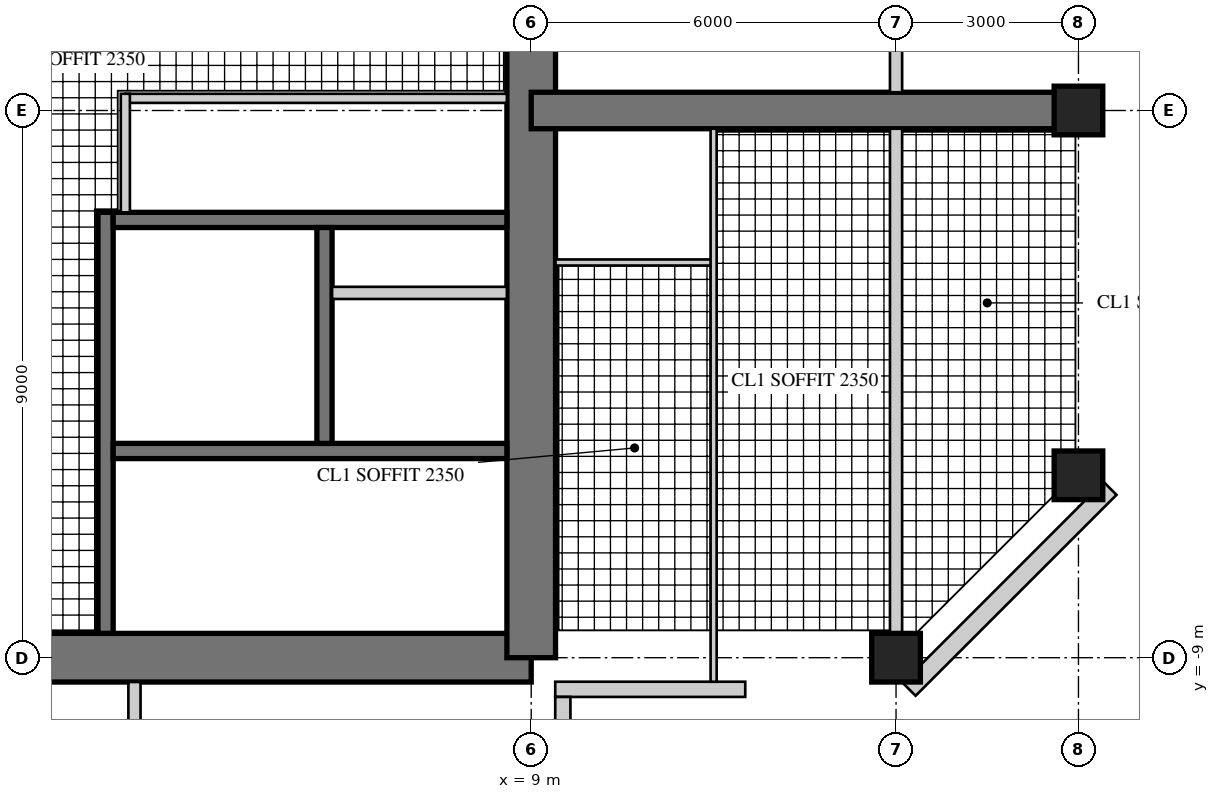
"""IFC4 building model, lengths in metres.
Left out: names, types, materials, properties, quantities, classifications, styles, units other than length and angle.
Written with IfcOpenShell. Run it as: python <this file> out.ifc"""

import sys

from ifc_helpers import new_model, si_unit, direction, frame, frame_2d, origin, origin_2d, place, context, subcontext, project, spatial, rectangle, hollow_rectangle, extrude, element, fill, save


model = new_model("IFC4")
c1 = context("Model", 3, precision=1e-05, world=origin(), true_north=direction((0.0, 1.0)))
c2 = subcontext(c1, "Body", "Model", "MODEL_VIEW")
j1 = project(units=[si_unit("LENGTHUNIT", "METRE"), si_unit("PLANEANGLEUNIT", "RADIAN")], contexts=[c1])
p1 = place(None, origin())
s1 = spatial("IfcSite", under=j1, at=p1, CompositionType="ELEMENT")
p2 = place(p1, origin())
s2 = spatial("IfcBuilding", under=s1, at=p2, CompositionType="ELEMENT")
p3 = place(p2, frame((0.0, 0.0, 242.5)))
s3 = spatial("IfcBuildingStorey", under=s2, at=p3, CompositionType="ELEMENT", Elevation=242.5)
p4 = place(p3, frame((-9.0, -9.0, 0.0), z_axis=(0.0, 0.0, 1.0), x_axis=(1.0, 0.0, 0.0)))
e1 = element("IfcWall", 1, at=p4, inside=s3, PredefinedType="SHEAR", context=c2, shape_type="SweptSolid", body=[
    extrude(rectangle(XDim=18.0, YDim=0.8, at=frame_2d((9.0, 0.0))), origin(), (0.0, 0.0, 1.0), 3.4),
])
p5 = place(p4, frame((9.8, 0.0, 0.0)))
e2 = element("IfcOpeningElement", 2, at=p5, cuts=e1, PredefinedType="OPENING", context=c2, shape_type="SweptSolid", body=[
    extrude(rectangle(XDim=1.0, YDim=2.4, at=frame_2d((0.5, 1.2))), frame((0.0, 0.41, 0.0), z_axis=(0.0, -1.0, 0.0), x_axis=(1.0, 0.0, 0.0)), (0.0, 0.0, 1.0), 0.82),
])
p6 = place(p3, frame((9.0, -9.0, 0.0), z_axis=(0.0, 0.0, 1.0), x_axis=(0.0, 1.0, 0.0)))
e3 = element("IfcWall", 3, at=p6, inside=s3, PredefinedType="SHEAR", context=c2, shape_type="SweptSolid", body=[
    extrude(rectangle(XDim=18.0, YDim=0.8, at=frame_2d((9.0, 0.0))), origin(), (0.0, 0.0, 1.0), 3.4),
])
p7 = place(p6, frame((9.8, 0.0, 0.0)))
e4 = element("IfcOpeningElement", 4, at=p7, cuts=e3, PredefinedType="OPENING", context=c2, shape_type="SweptSolid", body=[
    extrude(rectangle(XDim=1.0, YDim=2.4, at=frame_2d((0.5, 1.2))), frame((0.0, 0.41, 0.0), z_axis=(0.0, -1.0, 0.0), x_axis=(1.0, 0.0, 0.0)), (0.0, 0.0, 1.0), 0.82),
])
p8 = place(p3, frame((2.0, -1.675, 0.0), z_axis=(0.0, 0.0, 1.0), x_axis=(0.0, -1.0, 0.0)))
e5 = element("IfcWall", 5, at=p8, inside=s3, PredefinedType="SHEAR", context=c2, shape_type="SweptSolid", body=[
    extrude(rectangle(XDim=6.925, YDim=0.25, at=frame_2d((3.462, 0.0))), origin(), (0.0, 0.0, 1.0), 3.4),
])
p9 = place(p8, frame((0.725, 0.0, 0.0)))
e6 = element("IfcOpeningElement", 6, at=p9, cuts=e5, PredefinedType="OPENING", context=c2, shape_type="SweptSolid", body=[
    extrude(rectangle(XDim=1.0, YDim=2.1, at=frame_2d((0.5, 1.05))), frame((0.0, 0.135, 0.0), z_axis=(0.0, -1.0, 0.0), x_axis=(1.0, 0.0, 0.0)), (0.0, 0.0, 1.0), 0.27),
])
p10 = place(p3, frame((2.125, -1.8, 0.0), z_axis=(0.0, 0.0, 1.0), x_axis=(1.0, 0.0, 0.0)))
e7 = element("IfcWall", 7, at=p10, inside=s3, PredefinedType="SHEAR", context=c2, shape_type="SweptSolid", body=[
    extrude(rectangle(XDim=6.475, YDim=0.25, at=frame_2d((3.238, 0.0))), origin(), (0.0, 0.0, 1.0), 3.4),
])
p11 = place(p3, frame((2.125, -5.6, 0.0), z_axis=(0.0, 0.0, 1.0), x_axis=(1.0, 0.0, 0.0)))
e8 = element("IfcWall", 8, at=p11, inside=s3, PredefinedType="SHEAR", context=c2, shape_type="SweptSolid", body=[
    extrude(rectangle(XDim=6.475, YDim=0.25, at=frame_2d((3.238, 0.0))), origin(), (0.0, 0.0, 1.0), 3.4),
])
p12 = place(p11, frame((0.175, 0.0, 0.0)))
e9 = element("IfcOpeningElement", 9, at=p12, cuts=e8, PredefinedType="OPENING", context=c2, shape_type="SweptSolid", body=[
    extrude(rectangle(XDim=1.0, YDim=2.1, at=frame_2d((0.5, 1.05))), frame((0.0, 0.135, 0.0), z_axis=(0.0, -1.0, 0.0), x_axis=(1.0, 0.0, 0.0)), (0.0, 0.0, 1.0), 0.27),
])
p13 = place(p3, frame((5.6, -1.925, 0.0), z_axis=(0.0, 0.0, 1.0), x_axis=(0.0, -1.0, 0.0)))
e10 = element("IfcWall", 10, at=p13, inside=s3, PredefinedType="SHEAR", context=c2, shape_type="SweptSolid", body=[
    extrude(rectangle(XDim=3.55, YDim=0.25, at=frame_2d((1.775, 0.0))), origin(), (0.0, 0.0, 1.0), 3.4),
])
p14 = place(p13, frame((1.525, 0.0, 0.0)))
e11 = element("IfcOpeningElement", 11, at=p14, cuts=e10, PredefinedType="OPENING", context=c2, shape_type="SweptSolid", body=[
    extrude(rectangle(XDim=1.1, YDim=2.2, at=frame_2d((0.55, 1.1))), frame((0.0, 0.135, 0.0), z_axis=(0.0, -1.0, 0.0), x_axis=(1.0, 0.0, 0.0)), (0.0, 0.0, 1.0), 0.27),
])
p15 = place(p13, frame((0.075, 0.0, 0.0)))
e12 = element("IfcOpeningElement", 12, at=p15, cuts=e10, PredefinedType="OPENING", context=c2, shape_type="SweptSolid", body=[
    extrude(rectangle(XDim=0.8, YDim=2.1, at=frame_2d((0.4, 1.05))), frame((0.0, 0.135, 0.0), z_axis=(0.0, -1.0, 0.0), x_axis=(1.0, 0.0, 0.0)), (0.0, 0.0, 1.0), 0.27),
])
p16 = place(p3, frame((5.725, -3.0, 0.0), z_axis=(0.0, 0.0, 1.0), x_axis=(1.0, 0.0, 0.0)))
e13 = element("IfcWall", 13, at=p16, inside=s3, PredefinedType="PARTITIONING", context=c2, shape_type="SweptSolid", body=[
    extrude(rectangle(XDim=2.875, YDim=0.2, at=frame_2d((1.438, 0.0))), origin(), (0.0, 0.0, 1.0), 3.4),
])
p17 = place(p3, frame((9.0, 0.0, 0.0), z_axis=(0.0, 0.0, 1.0), x_axis=(1.0, 0.0, 0.0)))
e14 = element("IfcWall", 14, at=p17, inside=s3, PredefinedType="SHEAR", context=c2, shape_type="SweptSolid", body=[
    extrude(rectangle(XDim=9.0, YDim=0.6, at=frame_2d((4.5, 0.0))), origin(), (0.0, 0.0, 1.0), 3.4),
])
p18 = place(p17, frame((3.8, 0.0, 0.0)))
e15 = element("IfcOpeningElement", 15, at=p18, cuts=e14, PredefinedType="OPENING", context=c2, shape_type="SweptSolid", body=[
    extrude(rectangle(XDim=1.0, YDim=2.15, at=frame_2d((0.5, 1.075))), frame((0.0, 0.31, 0.0), z_axis=(0.0, -1.0, 0.0), x_axis=(1.0, 0.0, 0.0)), (0.0, 0.0, 1.0), 0.62),
])
p19 = place(p17, frame((7.0, 0.0, 0.0)))
e16 = element("IfcOpeningElement", 16, at=p19, cuts=e14, PredefinedType="OPENING", context=c2, shape_type="SweptSolid", body=[
    extrude(rectangle(XDim=1.0, YDim=2.2, at=frame_2d((0.5, 1.1))), frame((0.0, 0.31, 0.0), z_axis=(0.0, -1.0, 0.0), x_axis=(1.0, 0.0, 0.0)), (0.0, 0.0, 1.0), 0.62),
])
for number, where, z_axis, x_axis in (
    (17, (15.0, -9.0, 0.0), (0.0, 0.0, 1.0), (1.0, 0.0, 0.0)),
    (18, (18.0, -6.0, 0.0), (0.0, 0.0, 1.0), (1.0, 0.0, 0.0)),
    (19, (18.0, 0.0, 0.0), (0.0, 0.0, 1.0), (1.0, 0.0, 0.0)),
):
    element("IfcColumn", number, at=place(p3, frame(where, z_axis=z_axis, x_axis=x_axis)), inside=s3, PredefinedType="COLUMN", context=c2, shape_type="SweptSolid", body=[
        extrude(rectangle(XDim=0.8, YDim=0.8, at=origin_2d()), origin(), (0.0, 0.0, 1.0), 3.4),
    ])
p20 = place(p3, frame((9.395, -9.52, 0.0), z_axis=(0.0, 0.0, 1.0), x_axis=(1.0, 0.0, 0.0)))
e20 = element("IfcWall", 20, at=p20, inside=s3, PredefinedType="SOLIDWALL", context=c2, shape_type="SweptSolid", body=[
    extrude(rectangle(XDim=3.125, YDim=0.25, at=frame_2d((1.562, 0.0))), origin(), (0.0, 0.0, 1.0), 3.22),
])
p21 = place(p20, frame((0.6, 0.0, 0.0)))
e21 = element("IfcOpeningElement", 21, at=p21, cuts=e20, PredefinedType="OPENING", context=c2, shape_type="SweptSolid", body=[
    extrude(rectangle(XDim=1.0, YDim=2.2, at=frame_2d((0.5, 1.1))), frame((0.0, 0.135, 0.0), z_axis=(0.0, -1.0, 0.0), x_axis=(1.0, 0.0, 0.0)), (0.0, 0.0, 1.0), 0.27),
])
p22 = place(p3, frame((15.215, -9.52, 0.0), z_axis=(0.0, 0.0, 1.0), x_axis=(0.707106781187, 0.707106781187, 0.0)))
e22 = element("IfcWall", 22, at=p22, inside=s3, PredefinedType="SOLIDWALL", context=c2, shape_type="SweptSolid", body=[
    extrude(rectangle(XDim=4.674, YDim=0.3, at=frame_2d((2.337, 0.0))), origin(), (0.0, 0.0, 1.0), 3.22),
])
p23 = place(p22, frame((1.887, 0.0, 0.3)))
e23 = element("IfcOpeningElement", 23, at=p23, cuts=e22, PredefinedType="OPENING", context=c2, shape_type="SweptSolid", body=[
    extrude(rectangle(XDim=0.9, YDim=2.4, at=frame_2d((0.45, 1.2))), frame((0.0, 0.16, 0.0), z_axis=(0.0, -1.0, 0.0), x_axis=(1.0, 0.0, 0.0)), (0.0, 0.0, 1.0), 0.32),
])
p24 = place(p3, frame((9.52, -12.52, 0.0), z_axis=(0.0, 0.0, 1.0), x_axis=(0.0, 1.0, 0.0)))
e24 = element("IfcWall", 24, at=p24, inside=s3, PredefinedType="SOLIDWALL", context=c2, shape_type="SweptSolid", body=[
    extrude(rectangle(XDim=2.875, YDim=0.25, at=frame_2d((1.438, 0.0))), origin(), (0.0, 0.0, 1.0), 3.22),
])
p25 = place(p24, frame((0.6, 0.0, 0.0)))
e25 = element("IfcOpeningElement", 25, at=p25, cuts=e24, PredefinedType="OPENING", context=c2, shape_type="SweptSolid", body=[
    extrude(rectangle(XDim=1.0, YDim=2.2, at=frame_2d((0.5, 1.1))), frame((0.0, 0.135, 0.0), z_axis=(0.0, -1.0, 0.0), x_axis=(1.0, 0.0, 0.0)), (0.0, 0.0, 1.0), 0.27),
])
p26 = place(p3, frame((2.325, 0.2, 0.0), z_axis=(0.0, 0.0, 1.0), x_axis=(1.0, 0.0, 0.0)))
e26 = element("IfcWall", 26, at=p26, inside=s3, PredefinedType="PARTITIONING", context=c2, shape_type="SweptSolid", body=[
    extrude(rectangle(XDim=6.275, YDim=0.15, at=frame_2d((3.138, 0.0))), origin(), (0.0, 0.0, 1.0), 3.22),
])
p27 = place(p26, frame((0.4, 0.0, 0.0)))
e27 = element("IfcOpeningElement", 27, at=p27, cuts=e26, PredefinedType="OPENING", context=c2, shape_type="SweptSolid", body=[
    extrude(rectangle(XDim=1.0, YDim=2.1, at=frame_2d((0.5, 1.05))), frame((0.0, 0.085, 0.0), z_axis=(0.0, -1.0, 0.0), x_axis=(1.0, 0.0, 0.0)), (0.0, 0.0, 1.0), 0.17),
])
p28 = place(p3, frame((2.325, -1.675, 0.0), z_axis=(0.0, 0.0, 1.0), x_axis=(0.0, 1.0, 0.0)))
e28 = element("IfcWall", 28, at=p28, inside=s3, PredefinedType="PARTITIONING", context=c2, shape_type="SweptSolid", body=[
    extrude(rectangle(XDim=1.95, YDim=0.15, at=frame_2d((0.975, 0.0))), origin(), (0.0, 0.0, 1.0), 3.22),
])
p29 = place(p3, frame((9.4, -2.5, 0.0), z_axis=(0.0, 0.0, 1.0), x_axis=(1.0, 0.0, 0.0)))
e29 = element("IfcWall", 29, at=p29, inside=s3, PredefinedType="PARTITIONING", context=c2, shape_type="SweptSolid", body=[
    extrude(rectangle(XDim=2.65, YDim=0.1, at=frame_2d((1.325, 0.0))), origin(), (0.0, 0.0, 1.0), 3.22),
])
p30 = place(p3, frame((12.0, -9.395, 0.0), z_axis=(0.0, 0.0, 1.0), x_axis=(0.0, 1.0, 0.0)))
e30 = element("IfcWall", 30, at=p30, inside=s3, PredefinedType="PARTITIONING", context=c2, shape_type="SweptSolid", body=[
    extrude(rectangle(XDim=9.095, YDim=0.1, at=frame_2d((4.547, 0.0))), origin(), (0.0, 0.0, 1.0), 3.22),
])
p31 = place(p30, frame((5.545, 0.0, 0.0)))
e31 = element("IfcOpeningElement", 31, at=p31, cuts=e30, PredefinedType="OPENING", context=c2, shape_type="SweptSolid", body=[
    extrude(rectangle(XDim=0.9, YDim=2.1, at=frame_2d((0.45, 1.05))), frame((0.0, 0.06, 0.0), z_axis=(0.0, -1.0, 0.0), x_axis=(1.0, 0.0, 0.0)), (0.0, 0.0, 1.0), 0.12),
])
p32 = place(p30, frame((7.645, 0.0, 0.0)))
e32 = element("IfcOpeningElement", 32, at=p32, cuts=e30, PredefinedType="OPENING", context=c2, shape_type="SweptSolid", body=[
    extrude(rectangle(XDim=0.9, YDim=2.1, at=frame_2d((0.45, 1.05))), frame((0.0, 0.06, 0.0), z_axis=(0.0, -1.0, 0.0), x_axis=(1.0, 0.0, 0.0)), (0.0, 0.0, 1.0), 0.12),
])
p33 = place(p3, frame((15.0, -8.6, 0.0), z_axis=(0.0, 0.0, 1.0), x_axis=(0.0, 1.0, 0.0)))
e33 = element("IfcWall", 33, at=p33, inside=s3, PredefinedType="SOLIDWALL", context=c2, shape_type="SweptSolid", body=[
    extrude(rectangle(XDim=8.3, YDim=0.2, at=frame_2d((4.15, 0.0))), origin(), (0.0, 0.0, 1.0), 2.52),
])
p34 = place(p3, frame((15.0, 0.3, 0.0), z_axis=(0.0, 0.0, 1.0), x_axis=(0.0, 1.0, 0.0)))
e34 = element("IfcWall", 34, at=p34, inside=s3, PredefinedType="SOLIDWALL", context=c2, shape_type="SweptSolid", body=[
    extrude(rectangle(XDim=8.3, YDim=0.2, at=frame_2d((4.15, 0.0))), origin(), (0.0, 0.0, 1.0), 2.52),
])
p35 = place(p34, frame((0.45, 0.0, 0.0)))
e35 = element("IfcOpeningElement", 35, at=p35, cuts=e34, PredefinedType="OPENING", context=c2, shape_type="SweptSolid", body=[
    extrude(rectangle(XDim=1.0, YDim=2.2, at=frame_2d((0.5, 1.1))), frame((0.0, 0.11, 0.0), z_axis=(0.0, -1.0, 0.0), x_axis=(1.0, 0.0, 0.0)), (0.0, 0.0, 1.0), 0.22),
])
p36 = place(p3, frame((2.475, -9.4, 0.0), z_axis=(0.0, 0.0, 1.0), x_axis=(0.0, -1.0, 0.0)))
e36 = element("IfcWall", 36, at=p36, inside=s3, PredefinedType="SOLIDWALL", context=c2, shape_type="SweptSolid", body=[
    extrude(rectangle(XDim=5.6, YDim=0.2, at=frame_2d((2.8, 0.0))), origin(), (0.0, 0.0, 1.0), 3.22),
])
p37 = place(p36, frame((1.2, 0.0, 0.0)))
e37 = element("IfcOpeningElement", 37, at=p37, cuts=e36, PredefinedType="OPENING", context=c2, shape_type="SweptSolid", body=[
    extrude(rectangle(XDim=1.0, YDim=2.2, at=frame_2d((0.5, 1.1))), frame((0.0, 0.11, 0.0), z_axis=(0.0, -1.0, 0.0), x_axis=(1.0, 0.0, 0.0)), (0.0, 0.0, 1.0), 0.22),
])
p38 = place(p21, origin())
e38 = element("IfcDoor", 38, at=p38, inside=s3, OperationType="SINGLE_SWING_RIGHT", PredefinedType="DOOR", context=c2, shape_type="SweptSolid", body=[
    extrude(hollow_rectangle(XDim=1.0, YDim=2.2, WallThickness=0.06, at=frame_2d((0.5, 1.1))), frame((0.0, 0.025, 0.0), z_axis=(0.0, -1.0, 0.0), x_axis=(1.0, 0.0, 0.0)), (0.0, 0.0, 1.0), 0.05),
    extrude(rectangle(XDim=0.879, YDim=2.079, at=frame_2d((0.5, 1.1))), frame((0.0, 0.025, 0.0), z_axis=(0.0, -1.0, 0.0), x_axis=(1.0, 0.0, 0.0)), (0.0, 0.0, 1.0), 0.05),
])
fill(e21, e38)
p39 = place(p23, origin())
e39 = element("IfcWindow", 39, at=p39, inside=s3, PartitioningType="SINGLE_PANEL", PredefinedType="WINDOW", context=c2, shape_type="SweptSolid", body=[
    extrude(hollow_rectangle(XDim=0.9, YDim=2.4, WallThickness=0.06, at=frame_2d((0.45, 1.2))), frame((0.0, 0.03, 0.0), z_axis=(0.0, -1.0, 0.0), x_axis=(1.0, 0.0, 0.0)), (0.0, 0.0, 1.0), 0.06),
    extrude(rectangle(XDim=0.779, YDim=2.279, at=frame_2d((0.45, 1.2))), frame((0.0, 0.03, 0.0), z_axis=(0.0, -1.0, 0.0), x_axis=(1.0, 0.0, 0.0)), (0.0, 0.0, 1.0), 0.06),
])
fill(e23, e39)
p40 = place(p27, frame((1.0, 0.0, 0.0), z_axis=(0.0, 0.0, 1.0), x_axis=(-1.0, 0.0, 0.0)))
e40 = element("IfcDoor", 40, at=p40, inside=s3, OperationType="SINGLE_SWING_RIGHT", PredefinedType="DOOR", context=c2, shape_type="SweptSolid", body=[
    extrude(rectangle(XDim=1.0, YDim=2.1, at=frame_2d((0.5, 1.05))), frame((0.0, 0.025, 0.0), z_axis=(0.0, -1.0, 0.0), x_axis=(1.0, 0.0, 0.0)), (0.0, 0.0, 1.0), 0.05),
])
fill(e27, e40)
p41 = place(p31, origin())
e41 = element("IfcDoor", 41, at=p41, inside=s3, OperationType="SINGLE_SWING_RIGHT", PredefinedType="DOOR", context=c2, shape_type="SweptSolid", body=[
    extrude(rectangle(XDim=0.9, YDim=2.1, at=frame_2d((0.45, 1.05))), frame((0.0, 0.025, 0.0), z_axis=(0.0, -1.0, 0.0), x_axis=(1.0, 0.0, 0.0)), (0.0, 0.0, 1.0), 0.05),
])
fill(e31, e41)
p42 = place(p32, origin())
e42 = element("IfcDoor", 42, at=p42, inside=s3, OperationType="SINGLE_SWING_RIGHT", PredefinedType="DOOR", context=c2, shape_type="SweptSolid", body=[
    extrude(rectangle(XDim=0.9, YDim=2.1, at=frame_2d((0.45, 1.05))), frame((0.0, 0.025, 0.0), z_axis=(0.0, -1.0, 0.0), x_axis=(1.0, 0.0, 0.0)), (0.0, 0.0, 1.0), 0.05),
])
fill(e32, e42)
p43 = place(p35, frame((1.0, 0.0, 0.0), z_axis=(0.0, 0.0, 1.0), x_axis=(-1.0, 0.0, 0.0)))
e43 = element("IfcDoor", 43, at=p43, inside=s3, OperationType="SINGLE_SWING_LEFT", PredefinedType="DOOR", context=c2, shape_type="SweptSolid", body=[
    extrude(rectangle(XDim=1.0, YDim=2.2, at=frame_2d((0.5, 1.1))), frame((0.0, 0.025, 0.0), z_axis=(0.0, -1.0, 0.0), x_axis=(1.0, 0.0, 0.0)), (0.0, 0.0, 1.0), 0.05),
])
fill(e35, e43)
p44 = place(p18, frame((1.0, 0.0, 0.0), z_axis=(0.0, 0.0, 1.0), x_axis=(-1.0, 0.0, 0.0)))
e44 = element("IfcDoor", 44, at=p44, inside=s3, OperationType="SINGLE_SWING_RIGHT", PredefinedType="DOOR", context=c2, shape_type="SweptSolid", body=[
    extrude(rectangle(XDim=1.0, YDim=2.15, at=frame_2d((0.5, 1.075))), frame((0.0, 0.025, 0.0), z_axis=(0.0, -1.0, 0.0), x_axis=(1.0, 0.0, 0.0)), (0.0, 0.0, 1.0), 0.05),
])
fill(e15, e44)
p45 = place(p19, origin())
e45 = element("IfcDoor", 45, at=p45, inside=s3, OperationType="SINGLE_SWING_LEFT", PredefinedType="DOOR", context=c2, shape_type="SweptSolid", body=[
    extrude(rectangle(XDim=1.0, YDim=2.2, at=frame_2d((0.5, 1.1))), frame((0.0, 0.025, 0.0), z_axis=(0.0, -1.0, 0.0), x_axis=(1.0, 0.0, 0.0)), (0.0, 0.0, 1.0), 0.05),
])
fill(e16, e45)
p46 = place(p5, origin())
e46 = element("IfcDoor", 46, at=p46, inside=s3, OperationType="SINGLE_SWING_RIGHT", PredefinedType="DOOR", context=c2, shape_type="SweptSolid", body=[
    extrude(rectangle(XDim=1.0, YDim=2.4, at=frame_2d((0.5, 1.2))), frame((0.0, 0.055, 0.0), z_axis=(0.0, -1.0, 0.0), x_axis=(1.0, 0.0, 0.0)), (0.0, 0.0, 1.0), 0.05),
])
fill(e2, e46)
p47 = place(p7, origin())
e47 = element("IfcDoor", 47, at=p47, inside=s3, OperationType="SINGLE_SWING_RIGHT", PredefinedType="DOOR", context=c2, shape_type="SweptSolid", body=[
    extrude(rectangle(XDim=1.0, YDim=2.4, at=frame_2d((0.5, 1.2))), frame((0.0, 0.055, 0.0), z_axis=(0.0, -1.0, 0.0), x_axis=(1.0, 0.0, 0.0)), (0.0, 0.0, 1.0), 0.05),
])
fill(e4, e47)
p48 = place(p9, origin())
e48 = element("IfcDoor", 48, at=p48, inside=s3, OperationType="SINGLE_SWING_LEFT", PredefinedType="DOOR", context=c2, shape_type="SweptSolid", body=[
    extrude(rectangle(XDim=1.0, YDim=2.1, at=frame_2d((0.5, 1.05))), frame((0.0, 0.025, 0.0), z_axis=(0.0, -1.0, 0.0), x_axis=(1.0, 0.0, 0.0)), (0.0, 0.0, 1.0), 0.05),
])
fill(e6, e48)
p49 = place(p12, frame((1.0, 0.0, 0.0), z_axis=(0.0, 0.0, 1.0), x_axis=(-1.0, 0.0, 0.0)))
e49 = element("IfcDoor", 49, at=p49, inside=s3, OperationType="SINGLE_SWING_RIGHT", PredefinedType="DOOR", context=c2, shape_type="SweptSolid", body=[
    extrude(rectangle(XDim=1.0, YDim=2.1, at=frame_2d((0.5, 1.05))), frame((0.0, 0.025, 0.0), z_axis=(0.0, -1.0, 0.0), x_axis=(1.0, 0.0, 0.0)), (0.0, 0.0, 1.0), 0.05),
])
fill(e9, e49)
p50 = place(p14, origin())
e50 = element("IfcDoor", 50, at=p50, inside=s3, OperationType="DOUBLE_DOOR_SLIDING", PredefinedType="DOOR", context=c2, shape_type="SweptSolid", body=[
    extrude(rectangle(XDim=1.1, YDim=2.2, at=frame_2d((0.55, 1.1))), frame((0.0, 0.025, 0.0), z_axis=(0.0, -1.0, 0.0), x_axis=(1.0, 0.0, 0.0)), (0.0, 0.0, 1.0), 0.05),
])
fill(e11, e50)
p51 = place(p15, origin())
e51 = element("IfcDoor", 51, at=p51, inside=s3, OperationType="SINGLE_SWING_LEFT", PredefinedType="DOOR", context=c2, shape_type="SweptSolid", body=[
    extrude(rectangle(XDim=0.8, YDim=2.1, at=frame_2d((0.4, 1.05))), frame((0.0, 0.025, 0.0), z_axis=(0.0, -1.0, 0.0), x_axis=(1.0, 0.0, 0.0)), (0.0, 0.0, 1.0), 0.05),
])
fill(e12, e51)
save(model, sys.argv[1])
